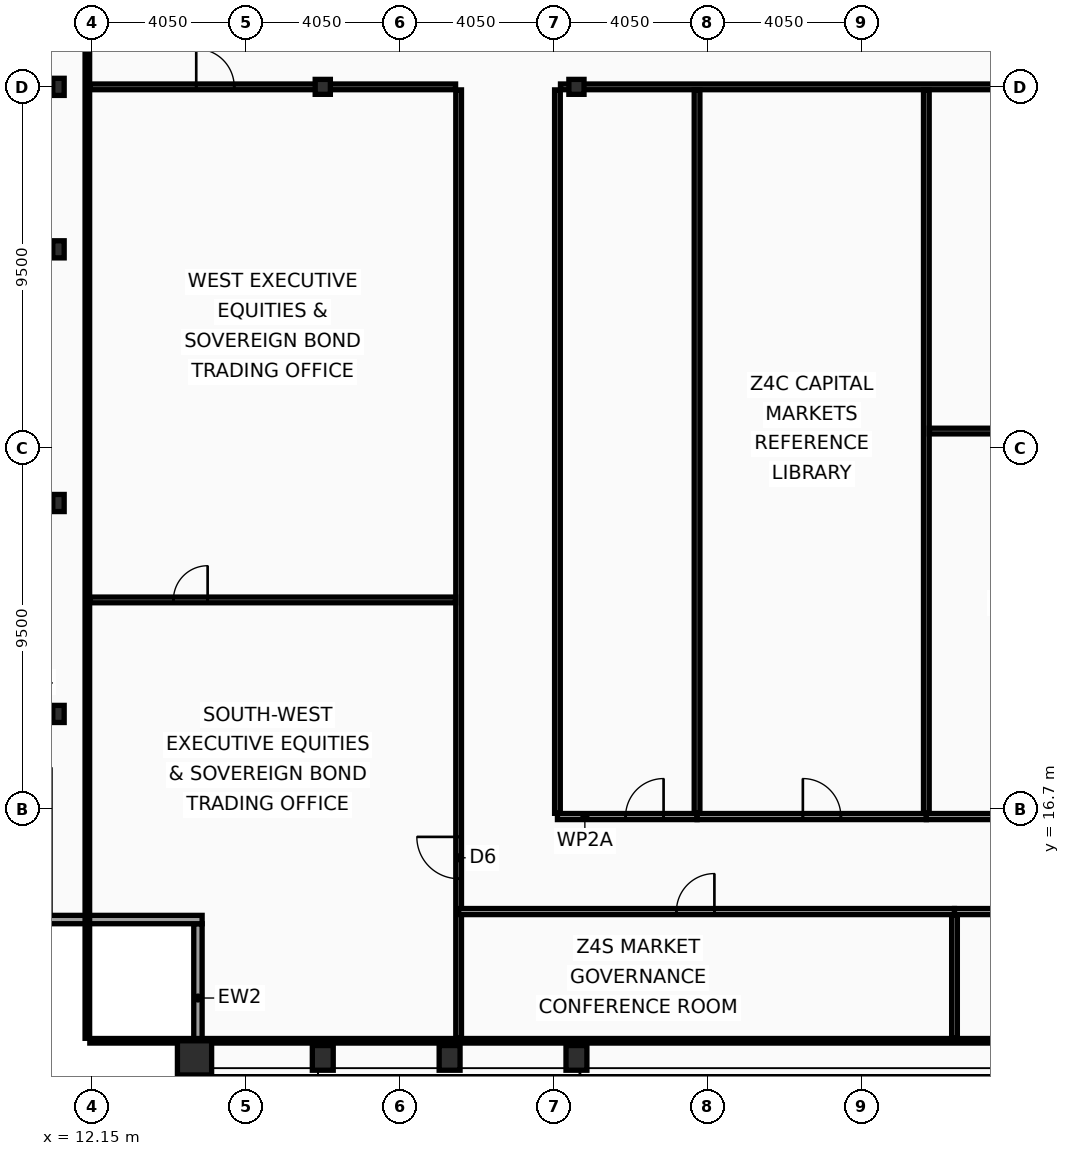
"""IFC4 building model, lengths in metres.
Left out: names, types, materials, properties, quantities, classifications, styles, units other than length and angle.
Written with IfcOpenShell. Run it as: python <this file> out.ifc"""

import sys

from ifc_helpers import new_model, si_unit, direction, frame, frame_2d, origin, origin_2d, place, context, subcontext, project, spatial, rectangle, hollow_rectangle, i_section, extrude, element, fill, save


model = new_model("IFC4")
c1 = context("Model", 3, precision=1e-05, world=origin(), true_north=direction((0.0, 1.0)))
c2 = subcontext(c1, "Body", "Model", "MODEL_VIEW")
j1 = project(units=[si_unit("LENGTHUNIT", "METRE"), si_unit("PLANEANGLEUNIT", "RADIAN")], contexts=[c1])
p1 = place(None, origin())
s1 = spatial("IfcSite", under=j1, at=p1, CompositionType="ELEMENT")
p2 = place(p1, origin())
s2 = spatial("IfcBuilding", under=s1, at=p2, CompositionType="ELEMENT")
p3 = place(p2, frame((0.0, 0.0, 336.2)))
s3 = spatial("IfcBuildingStorey", under=s2, at=p3, CompositionType="ELEMENT", Elevation=336.2)
p4 = place(p3, frame((14.85, 10.15, 0.0), z_axis=(0.0, 0.0, 1.0), x_axis=(1.0, 0.0, 0.0)))
e1 = element("IfcColumn", 1, at=p4, inside=s3, PredefinedType="COLUMN", context=c2, shape_type="SweptSolid", body=[
    extrude(hollow_rectangle(XDim=0.9, YDim=0.9, WallThickness=0.05, at=origin_2d()), origin(), (0.0, 0.0, 1.0), 3.6),
])
for number, where, z_axis, x_axis in (
    (2, (18.225, 10.15, 0.0), (0.0, 0.0, 1.0), (1.0, 0.0, 0.0)),
    (3, (21.562, 10.15, 0.0), (0.0, 0.0, 1.0), (1.0, 0.0, 0.0)),
    (4, (24.9, 10.15, 0.0), (0.0, 0.0, 1.0), (1.0, 0.0, 0.0)),
):
    element("IfcColumn", number, at=place(p3, frame(where, z_axis=z_axis, x_axis=x_axis)), inside=s3, PredefinedType="COLUMN", context=c2, shape_type="SweptSolid", body=[
        extrude(hollow_rectangle(XDim=0.55, YDim=0.65, WallThickness=0.04, at=origin_2d()), origin(), (0.0, 0.0, 1.0), 3.6),
    ])
for number, where, z_axis, x_axis in (
    (5, (11.27, 19.2, 0.0), (0.0, 0.0, 1.0), (1.0, 0.0, 0.0)),
    (6, (11.27, 24.75, 0.0), (0.0, 0.0, 1.0), (1.0, 0.0, 0.0)),
    (7, (11.27, 31.425, 0.0), (0.0, 0.0, 1.0), (1.0, 0.0, 0.0)),
    (8, (11.27, 35.7, 0.0), (0.0, 0.0, 1.0), (1.0, 0.0, 0.0)),
):
    element("IfcColumn", number, at=place(p3, frame(where, z_axis=z_axis, x_axis=x_axis)), inside=s3, PredefinedType="COLUMN", context=c2, shape_type="SweptSolid", body=[
        extrude(i_section(OverallWidth=0.3, OverallDepth=0.45, WebThickness=0.014, FlangeThickness=0.026, at=origin_2d()), origin(), (0.0, 0.0, 1.0), 3.6),
    ])
for number, where, z_axis, x_axis in (
    (9, (18.225, 35.7, 0.0), (0.0, 0.0, 1.0), (1.0, 0.0, 0.0)),
    (10, (24.9, 35.7, 0.0), (0.0, 0.0, 1.0), (1.0, 0.0, 0.0)),
):
    element("IfcColumn", number, at=place(p3, frame(where, z_axis=z_axis, x_axis=x_axis)), inside=s3, PredefinedType="COLUMN", context=c2, shape_type="SweptSolid", body=[
        extrude(i_section(OverallWidth=0.399, OverallDepth=0.393, WebThickness=0.023, FlangeThickness=0.037, at=origin_2d()), origin(), (0.0, 0.0, 1.0), 3.6),
    ])
p5 = place(p3, frame((14.94, 9.77, 0.0), z_axis=(0.0, 0.0, 1.0), x_axis=(0.0, 1.0, 0.0)))
e11 = element("IfcWall", 11, at=p5, inside=s3, PredefinedType="SOLIDWALL", context=c2, shape_type="SweptSolid", body=[
    extrude(rectangle(XDim=3.91, YDim=0.22, at=frame_2d((1.955, 0.0))), origin(), (0.0, 0.0, 1.0), 2.88),
])
p6 = place(p3, frame((15.05, 13.79, 0.0), z_axis=(0.0, 0.0, 1.0), x_axis=(-1.0, 0.0, 0.0)))
e12 = element("IfcWall", 12, at=p6, inside=s3, PredefinedType="SOLIDWALL", context=c2, shape_type="SweptSolid", body=[
    extrude(rectangle(XDim=4.22, YDim=0.22, at=frame_2d((2.11, 0.0))), origin(), (0.0, 0.0, 1.0), 2.88),
])
p7 = place(p3, frame((21.8, 10.665, 0.0), z_axis=(0.0, 0.0, 1.0), x_axis=(0.0, 1.0, 0.0)))
e13 = element("IfcWall", 13, at=p7, inside=s3, PredefinedType="PARTITIONING", context=c2, shape_type="SweptSolid", body=[
    extrude(rectangle(XDim=24.955, YDim=0.15, at=frame_2d((12.478, 0.0))), origin(), (0.0, 0.0, 1.0), 3.07),
])
p8 = place(p7, frame((4.2, 0.0, 0.0)))
e14 = element("IfcOpeningElement", 14, at=p8, cuts=e13, PredefinedType="OPENING", context=c2, shape_type="SweptSolid", body=[
    extrude(rectangle(XDim=1.1, YDim=2.1, at=frame_2d((0.55, 1.05))), frame((0.0, 0.085, 0.0), z_axis=(0.0, -1.0, 0.0), x_axis=(1.0, 0.0, 0.0)), (0.0, 0.0, 1.0), 0.17),
])
p9 = place(p3, frame((12.095, 35.7, 0.0), z_axis=(0.0, 0.0, 1.0), x_axis=(1.0, 0.0, 0.0)))
e15 = element("IfcWall", 15, at=p9, inside=s3, PredefinedType="PARTITIONING", context=c2, shape_type="SweptSolid", body=[
    extrude(rectangle(XDim=9.625, YDim=0.15, at=frame_2d((4.812, 0.0))), origin(), (0.0, 0.0, 1.0), 2.83),
])
p10 = place(p9, frame((2.8, 0.0, 0.0)))
e16 = element("IfcOpeningElement", 16, at=p10, cuts=e15, PredefinedType="OPENING", context=c2, shape_type="SweptSolid", body=[
    extrude(rectangle(XDim=1.0, YDim=2.05, at=frame_2d((0.5, 1.025))), frame((0.0, 0.085, 0.0), z_axis=(0.0, -1.0, 0.0), x_axis=(1.0, 0.0, 0.0)), (0.0, 0.0, 1.0), 0.17),
])
p11 = place(p3, frame((12.095, 22.2, 0.0), z_axis=(0.0, 0.0, 1.0), x_axis=(1.0, 0.0, 0.0)))
e17 = element("IfcWall", 17, at=p11, inside=s3, PredefinedType="PARTITIONING", context=c2, shape_type="SweptSolid", body=[
    extrude(rectangle(XDim=9.625, YDim=0.15, at=frame_2d((4.812, 0.0))), origin(), (0.0, 0.0, 1.0), 2.83),
])
p12 = place(p11, frame((2.2, 0.0, 0.0)))
e18 = element("IfcOpeningElement", 18, at=p12, cuts=e17, PredefinedType="OPENING", context=c2, shape_type="SweptSolid", body=[
    extrude(rectangle(XDim=0.9, YDim=2.05, at=frame_2d((0.45, 1.025))), frame((0.0, 0.085, 0.0), z_axis=(0.0, -1.0, 0.0), x_axis=(1.0, 0.0, 0.0)), (0.0, 0.0, 1.0), 0.17),
])
p13 = place(p3, frame((24.4, 16.585, 0.0), z_axis=(0.0, 0.0, 1.0), x_axis=(0.0, 1.0, 0.0)))
e19 = element("IfcWall", 19, at=p13, inside=s3, PredefinedType="PARTITIONING", context=c2, shape_type="SweptSolid", body=[
    extrude(rectangle(XDim=19.035, YDim=0.15, at=frame_2d((9.518, 0.0))), origin(), (0.0, 0.0, 1.0), 2.83),
])
p14 = place(p3, frame((24.48, 35.7, 0.0), z_axis=(0.0, 0.0, 1.0), x_axis=(1.0, 0.0, 0.0)))
e20 = element("IfcWall", 20, at=p14, inside=s3, PredefinedType="PARTITIONING", context=c2, shape_type="SweptSolid", body=[
    extrude(rectangle(XDim=25.02, YDim=0.15, at=frame_2d((12.51, 0.0))), origin(), (0.0, 0.0, 1.0), 2.83),
])
p15 = place(p3, frame((24.4, 16.5, 0.0), z_axis=(0.0, 0.0, 1.0), x_axis=(1.0, 0.0, 0.0)))
e21 = element("IfcWall", 21, at=p15, inside=s3, PredefinedType="PARTITIONING", context=c2, shape_type="SweptSolid", body=[
    extrude(rectangle(XDim=3.674, YDim=0.16, at=frame_2d((1.837, 0.0))), origin(), (0.0, 0.0, 1.0), 2.83),
])
p16 = place(p15, frame((1.793, 0.0, 0.0)))
e22 = element("IfcOpeningElement", 22, at=p16, cuts=e21, PredefinedType="OPENING", context=c2, shape_type="SweptSolid", body=[
    extrude(rectangle(XDim=1.0, YDim=2.05, at=frame_2d((0.5, 1.025))), frame((0.0, 0.09, 0.0), z_axis=(0.0, -1.0, 0.0), x_axis=(1.0, 0.0, 0.0)), (0.0, 0.0, 1.0), 0.18),
])
p17 = place(p3, frame((28.074, 16.5, 0.0), z_axis=(0.0, 0.0, 1.0), x_axis=(1.0, 0.0, 0.0)))
e23 = element("IfcWall", 23, at=p17, inside=s3, PredefinedType="PARTITIONING", context=c2, shape_type="SweptSolid", body=[
    extrude(rectangle(XDim=6.033, YDim=0.16, at=frame_2d((3.017, 0.0))), origin(), (0.0, 0.0, 1.0), 3.07),
])
p18 = place(p17, frame((2.784, 0.0, 0.0)))
e24 = element("IfcOpeningElement", 24, at=p18, cuts=e23, PredefinedType="OPENING", context=c2, shape_type="SweptSolid", body=[
    extrude(rectangle(XDim=1.0, YDim=2.05, at=frame_2d((0.5, 1.025))), frame((0.0, 0.09, 0.0), z_axis=(0.0, -1.0, 0.0), x_axis=(1.0, 0.0, 0.0)), (0.0, 0.0, 1.0), 0.18),
])
p19 = place(p3, frame((28.074, 16.585, 0.0), z_axis=(0.0, 0.0, 1.0), x_axis=(0.0, 1.0, 0.0)))
e25 = element("IfcWall", 25, at=p19, inside=s3, PredefinedType="PARTITIONING", context=c2, shape_type="SweptSolid", body=[
    extrude(rectangle(XDim=19.035, YDim=0.15, at=frame_2d((9.518, 0.0))), origin(), (0.0, 0.0, 1.0), 3.07),
])
p20 = place(p3, frame((34.107, 16.5, 0.0), z_axis=(0.0, 0.0, 1.0), x_axis=(1.0, 0.0, 0.0)))
e26 = element("IfcWall", 26, at=p20, inside=s3, PredefinedType="PARTITIONING", context=c2, shape_type="SweptSolid", body=[
    extrude(rectangle(XDim=8.929, YDim=0.16, at=frame_2d((4.465, 0.0))), origin(), (0.0, 0.0, 1.0), 3.07),
])
p21 = place(p20, frame((4.0, 0.0, 0.0)))
e27 = element("IfcOpeningElement", 27, at=p21, cuts=e26, PredefinedType="OPENING", context=c2, shape_type="SweptSolid", body=[
    extrude(rectangle(XDim=1.0, YDim=2.05, at=frame_2d((0.5, 1.025))), frame((0.0, 0.09, 0.0), z_axis=(0.0, -1.0, 0.0), x_axis=(1.0, 0.0, 0.0)), (0.0, 0.0, 1.0), 0.18),
])
p22 = place(p3, frame((34.107, 16.585, 0.0), z_axis=(0.0, 0.0, 1.0), x_axis=(0.0, 1.0, 0.0)))
e28 = element("IfcWall", 28, at=p22, inside=s3, PredefinedType="PARTITIONING", context=c2, shape_type="SweptSolid", body=[
    extrude(rectangle(XDim=19.035, YDim=0.15, at=frame_2d((9.518, 0.0))), origin(), (0.0, 0.0, 1.0), 3.07),
])
p23 = place(p3, frame((34.187, 26.643, 0.0), z_axis=(0.0, 0.0, 1.0), x_axis=(1.0, 0.0, 0.0)))
e29 = element("IfcWall", 29, at=p23, inside=s3, PredefinedType="PARTITIONING", context=c2, shape_type="SweptSolid", body=[
    extrude(rectangle(XDim=8.769, YDim=0.15, at=frame_2d((4.385, 0.0))), origin(), (0.0, 0.0, 1.0), 3.44),
])
p24 = place(p23, frame((4.018, 0.0, 0.0)))
e30 = element("IfcOpeningElement", 30, at=p24, cuts=e29, PredefinedType="OPENING", context=c2, shape_type="SweptSolid", body=[
    extrude(rectangle(XDim=0.9, YDim=2.05, at=frame_2d((0.45, 1.025))), frame((0.0, 0.085, 0.0), z_axis=(0.0, -1.0, 0.0), x_axis=(1.0, 0.0, 0.0)), (0.0, 0.0, 1.0), 0.17),
])
p25 = place(p3, frame((21.8, 14.0, 0.0), z_axis=(0.0, 0.0, 1.0), x_axis=(1.0, 0.0, 0.0)))
e31 = element("IfcWall", 31, at=p25, inside=s3, PredefinedType="PARTITIONING", context=c2, shape_type="SweptSolid", body=[
    extrude(rectangle(XDim=13.048, YDim=0.16, at=frame_2d((6.524, 0.0))), origin(), (0.0, 0.0, 1.0), 2.83),
])
p26 = place(p25, frame((5.73, 0.0, 0.0)))
e32 = element("IfcOpeningElement", 32, at=p26, cuts=e31, PredefinedType="OPENING", context=c2, shape_type="SweptSolid", body=[
    extrude(rectangle(XDim=1.0, YDim=2.05, at=frame_2d((0.5, 1.025))), frame((0.0, 0.09, 0.0), z_axis=(0.0, -1.0, 0.0), x_axis=(1.0, 0.0, 0.0)), (0.0, 0.0, 1.0), 0.18),
])
p27 = place(p3, frame((34.848, 14.0, 0.0), z_axis=(0.0, 0.0, 1.0), x_axis=(1.0, 0.0, 0.0)))
e33 = element("IfcWall", 33, at=p27, inside=s3, PredefinedType="PARTITIONING", context=c2, shape_type="SweptSolid", body=[
    extrude(rectangle(XDim=7.576, YDim=0.16, at=frame_2d((3.788, 0.0))), origin(), (0.0, 0.0, 1.0), 3.44),
])
p28 = place(p27, frame((3.432, 0.0, 0.0)))
e34 = element("IfcOpeningElement", 34, at=p28, cuts=e33, PredefinedType="OPENING", context=c2, shape_type="SweptSolid", body=[
    extrude(rectangle(XDim=1.0, YDim=2.05, at=frame_2d((0.5, 1.025))), frame((0.0, 0.09, 0.0), z_axis=(0.0, -1.0, 0.0), x_axis=(1.0, 0.0, 0.0)), (0.0, 0.0, 1.0), 0.18),
])
p29 = place(p3, frame((34.848, 10.665, 0.0), z_axis=(0.0, 0.0, 1.0), x_axis=(0.0, 1.0, 0.0)))
e35 = element("IfcWall", 35, at=p29, inside=s3, PredefinedType="PARTITIONING", context=c2, shape_type="SweptSolid", body=[
    extrude(rectangle(XDim=3.25, YDim=0.15, at=frame_2d((1.625, 0.0))), origin(), (0.0, 0.0, 1.0), 3.44),
])
p30 = place(p3, frame((12.03, 10.665, 0.0), z_axis=(0.0, 0.0, 1.0), x_axis=(0.0, 1.0, 0.0)))
e36 = element("IfcWall", 36, at=p30, inside=s3, PredefinedType="PARTITIONING", context=c2, shape_type="SweptSolid", body=[
    extrude(rectangle(XDim=42.11, YDim=0.12, at=frame_2d((21.055, 0.0))), origin(), (0.0, 0.0, 1.0), 2.83),
])
p31 = place(p3, frame((12.095, 10.6, 0.0), z_axis=(0.0, 0.0, 1.0), x_axis=(1.0, 0.0, 0.0)))
e37 = element("IfcWall", 37, at=p31, inside=s3, PredefinedType="PARTITIONING", context=c2, shape_type="SweptSolid", body=[
    extrude(rectangle(XDim=48.71, YDim=0.12, at=frame_2d((24.355, 0.0))), origin(), (0.0, 0.0, 1.0), 2.83),
])
p32 = place(p8, origin())
e38 = element("IfcDoor", 38, at=p32, inside=s3, OperationType="SINGLE_SWING_RIGHT", PredefinedType="DOOR", context=c2, shape_type="SweptSolid", body=[
    extrude(rectangle(XDim=1.1, YDim=2.1, at=frame_2d((0.55, 1.05))), frame((0.0, 0.025, 0.0), z_axis=(0.0, -1.0, 0.0), x_axis=(1.0, 0.0, 0.0)), (0.0, 0.0, 1.0), 0.05),
])
fill(e14, e38)
p33 = place(p10, origin())
e39 = element("IfcDoor", 39, at=p33, inside=s3, OperationType="SINGLE_SWING_LEFT", PredefinedType="DOOR", context=c2, shape_type="SweptSolid", body=[
    extrude(rectangle(XDim=1.0, YDim=2.05, at=frame_2d((0.5, 1.025))), frame((0.0, 0.025, 0.0), z_axis=(0.0, -1.0, 0.0), x_axis=(1.0, 0.0, 0.0)), (0.0, 0.0, 1.0), 0.05),
])
fill(e16, e39)
p34 = place(p12, origin())
e40 = element("IfcDoor", 40, at=p34, inside=s3, OperationType="SINGLE_SWING_RIGHT", PredefinedType="DOOR", context=c2, shape_type="SweptSolid", body=[
    extrude(rectangle(XDim=0.9, YDim=2.05, at=frame_2d((0.45, 1.025))), frame((0.0, 0.025, 0.0), z_axis=(0.0, -1.0, 0.0), x_axis=(1.0, 0.0, 0.0)), (0.0, 0.0, 1.0), 0.05),
])
fill(e18, e40)
p35 = place(p16, origin())
e41 = element("IfcDoor", 41, at=p35, inside=s3, OperationType="SINGLE_SWING_RIGHT", PredefinedType="DOOR", context=c2, shape_type="SweptSolid", body=[
    extrude(rectangle(XDim=1.0, YDim=2.05, at=frame_2d((0.5, 1.025))), frame((0.0, 0.025, 0.0), z_axis=(0.0, -1.0, 0.0), x_axis=(1.0, 0.0, 0.0)), (0.0, 0.0, 1.0), 0.05),
])
fill(e22, e41)
p36 = place(p18, origin())
e42 = element("IfcDoor", 42, at=p36, inside=s3, OperationType="SINGLE_SWING_LEFT", PredefinedType="DOOR", context=c2, shape_type="SweptSolid", body=[
    extrude(rectangle(XDim=1.0, YDim=2.05, at=frame_2d((0.5, 1.025))), frame((0.0, 0.025, 0.0), z_axis=(0.0, -1.0, 0.0), x_axis=(1.0, 0.0, 0.0)), (0.0, 0.0, 1.0), 0.05),
])
fill(e24, e42)
p37 = place(p26, origin())
e43 = element("IfcDoor", 43, at=p37, inside=s3, OperationType="SINGLE_SWING_RIGHT", PredefinedType="DOOR", context=c2, shape_type="SweptSolid", body=[
    extrude(rectangle(XDim=1.0, YDim=2.05, at=frame_2d((0.5, 1.025))), frame((0.0, 0.025, 0.0), z_axis=(0.0, -1.0, 0.0), x_axis=(1.0, 0.0, 0.0)), (0.0, 0.0, 1.0), 0.05),
])
fill(e32, e43)
save(model, sys.argv[1])
